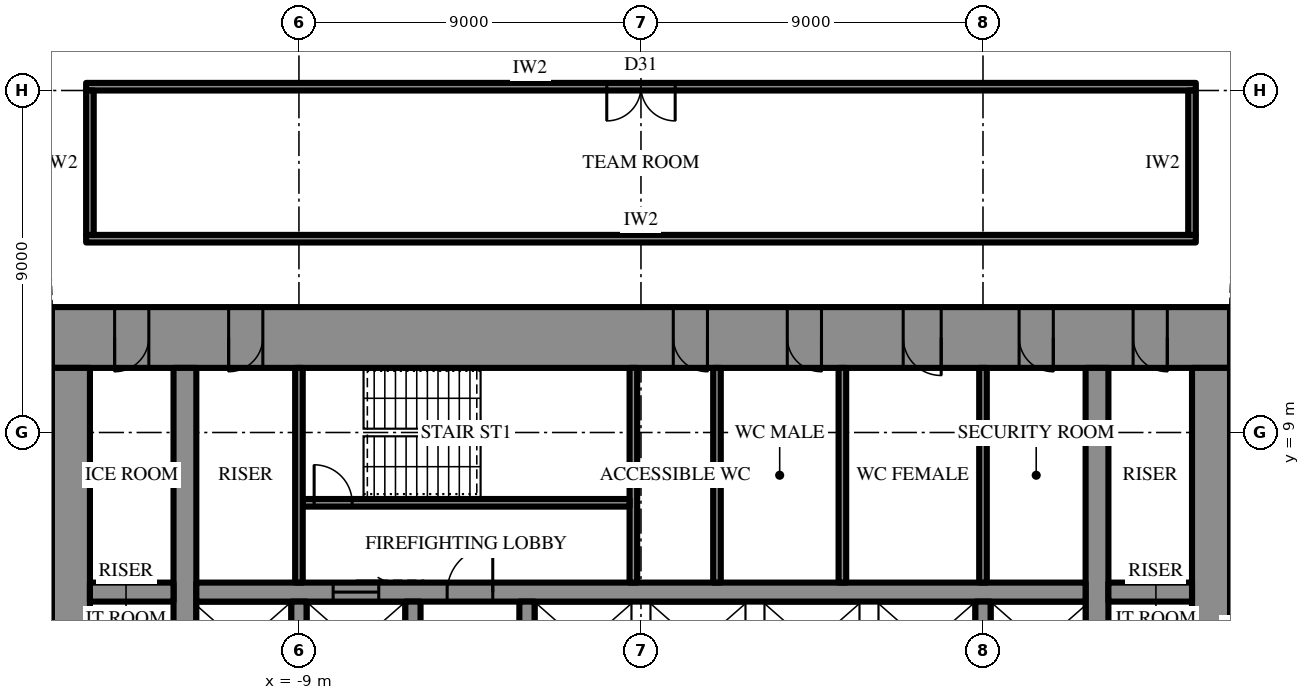
"""IFC4 building model, lengths in metres.
Left out: names, types, materials, properties, quantities, classifications, styles, units other than length and angle.
Written with IfcOpenShell. Run it as: python <this file> out.ifc"""

import sys

from ifc_helpers import new_model, si_unit, direction, frame, frame_2d, origin, place, context, subcontext, project, spatial, rectangle, extrude, element, fill, save


model = new_model("IFC4")
c1 = context("Model", 3, precision=1e-05, world=origin(), true_north=direction((0.0, 1.0)))
c2 = subcontext(c1, "Body", "Model", "MODEL_VIEW")
j1 = project(units=[si_unit("LENGTHUNIT", "METRE"), si_unit("PLANEANGLEUNIT", "RADIAN")], contexts=[c1])
p1 = place(None, origin())
s1 = spatial("IfcSite", under=j1, at=p1, CompositionType="ELEMENT")
p2 = place(p1, origin())
s2 = spatial("IfcBuilding", under=s1, at=p2, CompositionType="ELEMENT")
p3 = place(p2, frame((0.0, 0.0, 286.9)))
s3 = spatial("IfcBuildingStorey", under=s2, at=p3, CompositionType="ELEMENT", Elevation=286.9)
p4 = place(p3, frame((-15.5, 11.5, 0.0), z_axis=(0.0, 0.0, 1.0), x_axis=(1.0, 0.0, 0.0)))
e1 = element("IfcWall", 1, at=p4, inside=s3, PredefinedType="SHEAR", context=c2, shape_type="SweptSolid", body=[
    extrude(rectangle(XDim=31.0, YDim=1.6, at=frame_2d((15.5, 0.0))), origin(), (0.0, 0.0, 1.0), 4.2),
])
p5 = place(p4, frame((16.35, 0.0, 0.0)))
e2 = element("IfcOpeningElement", 2, at=p5, cuts=e1, PredefinedType="OPENING", context=c2, shape_type="SweptSolid", body=[
    extrude(rectangle(XDim=0.9, YDim=2.2, at=frame_2d((0.45, 1.1))), frame((0.0, 0.81, 0.0), z_axis=(0.0, -1.0, 0.0), x_axis=(1.0, 0.0, 0.0)), (0.0, 0.0, 1.0), 1.62),
])
p6 = place(p4, frame((19.35, 0.0, 0.0)))
e3 = element("IfcOpeningElement", 3, at=p6, cuts=e1, PredefinedType="OPENING", context=c2, shape_type="SweptSolid", body=[
    extrude(rectangle(XDim=0.9, YDim=2.2, at=frame_2d((0.45, 1.1))), frame((0.0, 0.81, 0.0), z_axis=(0.0, -1.0, 0.0), x_axis=(1.0, 0.0, 0.0)), (0.0, 0.0, 1.0), 1.62),
])
p7 = place(p4, frame((22.4, 0.0, 0.0)))
e4 = element("IfcOpeningElement", 4, at=p7, cuts=e1, PredefinedType="OPENING", context=c2, shape_type="SweptSolid", body=[
    extrude(rectangle(XDim=1.0, YDim=2.2, at=frame_2d((0.5, 1.1))), frame((0.0, 0.81, 0.0), z_axis=(0.0, -1.0, 0.0), x_axis=(1.0, 0.0, 0.0)), (0.0, 0.0, 1.0), 1.62),
])
p8 = place(p4, frame((1.65, 0.0, 0.0)))
e5 = element("IfcOpeningElement", 5, at=p8, cuts=e1, PredefinedType="OPENING", context=c2, shape_type="SweptSolid", body=[
    extrude(rectangle(XDim=0.9, YDim=2.2, at=frame_2d((0.45, 1.1))), frame((0.0, 0.81, 0.0), z_axis=(0.0, -1.0, 0.0), x_axis=(1.0, 0.0, 0.0)), (0.0, 0.0, 1.0), 1.62),
])
p9 = place(p4, frame((4.65, 0.0, 0.0)))
e6 = element("IfcOpeningElement", 6, at=p9, cuts=e1, PredefinedType="OPENING", context=c2, shape_type="SweptSolid", body=[
    extrude(rectangle(XDim=0.9, YDim=2.2, at=frame_2d((0.45, 1.1))), frame((0.0, 0.81, 0.0), z_axis=(0.0, -1.0, 0.0), x_axis=(1.0, 0.0, 0.0)), (0.0, 0.0, 1.0), 1.62),
])
p10 = place(p4, frame((25.45, 0.0, 0.0)))
e7 = element("IfcOpeningElement", 7, at=p10, cuts=e1, PredefinedType="OPENING", context=c2, shape_type="SweptSolid", body=[
    extrude(rectangle(XDim=0.9, YDim=2.2, at=frame_2d((0.45, 1.1))), frame((0.0, 0.81, 0.0), z_axis=(0.0, -1.0, 0.0), x_axis=(1.0, 0.0, 0.0)), (0.0, 0.0, 1.0), 1.62),
])
p11 = place(p4, frame((28.45, 0.0, 0.0)))
e8 = element("IfcOpeningElement", 8, at=p11, cuts=e1, PredefinedType="OPENING", context=c2, shape_type="SweptSolid", body=[
    extrude(rectangle(XDim=0.9, YDim=2.2, at=frame_2d((0.45, 1.1))), frame((0.0, 0.81, 0.0), z_axis=(0.0, -1.0, 0.0), x_axis=(1.0, 0.0, 0.0)), (0.0, 0.0, 1.0), 1.62),
])
p12 = place(p3, frame((15.0, -10.7, 0.0), z_axis=(0.0, 0.0, 1.0), x_axis=(0.0, 1.0, 0.0)))
e9 = element("IfcWall", 9, at=p12, inside=s3, PredefinedType="SHEAR", context=c2, shape_type="SweptSolid", body=[
    extrude(rectangle(XDim=21.4, YDim=1.0, at=frame_2d((10.7, 0.0))), origin(), (0.0, 0.0, 1.0), 4.2),
])
p13 = place(p12, frame((9.8, 0.0, 0.0)))
e10 = element("IfcOpeningElement", 10, at=p13, cuts=e9, PredefinedType="OPENING", context=c2, shape_type="SweptSolid", body=[
    extrude(rectangle(XDim=1.8, YDim=2.4, at=frame_2d((0.9, 1.2))), frame((0.0, 0.51, 0.0), z_axis=(0.0, -1.0, 0.0), x_axis=(1.0, 0.0, 0.0)), (0.0, 0.0, 1.0), 1.02),
])
p14 = place(p3, frame((-15.0, 10.7, 0.0), z_axis=(0.0, 0.0, 1.0), x_axis=(0.0, -1.0, 0.0)))
e11 = element("IfcWall", 11, at=p14, inside=s3, PredefinedType="SHEAR", context=c2, shape_type="SweptSolid", body=[
    extrude(rectangle(XDim=21.4, YDim=1.0, at=frame_2d((10.7, 0.0))), origin(), (0.0, 0.0, 1.0), 4.2),
])
p15 = place(p14, frame((9.8, 0.0, 0.0)))
e12 = element("IfcOpeningElement", 12, at=p15, cuts=e11, PredefinedType="OPENING", context=c2, shape_type="SweptSolid", body=[
    extrude(rectangle(XDim=1.8, YDim=2.4, at=frame_2d((0.9, 1.2))), frame((0.0, 0.51, 0.0), z_axis=(0.0, -1.0, 0.0), x_axis=(1.0, 0.0, 0.0)), (0.0, 0.0, 1.0), 1.02),
])
p16 = place(p3, frame((12.0, -10.7, 0.0), z_axis=(0.0, 0.0, 1.0), x_axis=(0.0, 1.0, 0.0)))
e13 = element("IfcWall", 13, at=p16, inside=s3, PredefinedType="SHEAR", context=c2, shape_type="SweptSolid", body=[
    extrude(rectangle(XDim=21.4, YDim=0.6, at=frame_2d((10.7, 0.0))), origin(), (0.0, 0.0, 1.0), 4.2),
])
p17 = place(p16, frame((9.8, 0.0, 0.0)))
e14 = element("IfcOpeningElement", 14, at=p17, cuts=e13, PredefinedType="OPENING", context=c2, shape_type="SweptSolid", body=[
    extrude(rectangle(XDim=1.8, YDim=2.4, at=frame_2d((0.9, 1.2))), frame((0.0, 0.31, 0.0), z_axis=(0.0, -1.0, 0.0), x_axis=(1.0, 0.0, 0.0)), (0.0, 0.0, 1.0), 0.62),
])
p18 = place(p3, frame((-12.0, -10.7, 0.0), z_axis=(0.0, 0.0, 1.0), x_axis=(0.0, 1.0, 0.0)))
e15 = element("IfcWall", 15, at=p18, inside=s3, PredefinedType="SHEAR", context=c2, shape_type="SweptSolid", body=[
    extrude(rectangle(XDim=21.4, YDim=0.6, at=frame_2d((10.7, 0.0))), origin(), (0.0, 0.0, 1.0), 4.2),
])
p19 = place(p18, frame((9.8, 0.0, 0.0)))
e16 = element("IfcOpeningElement", 16, at=p19, cuts=e15, PredefinedType="OPENING", context=c2, shape_type="SweptSolid", body=[
    extrude(rectangle(XDim=1.8, YDim=2.4, at=frame_2d((0.9, 1.2))), frame((0.0, 0.31, 0.0), z_axis=(0.0, -1.0, 0.0), x_axis=(1.0, 0.0, 0.0)), (0.0, 0.0, 1.0), 0.62),
])
p20 = place(p3, frame((-14.5, 4.8, 0.0), z_axis=(0.0, 0.0, 1.0), x_axis=(1.0, 0.0, 0.0)))
e17 = element("IfcWall", 17, at=p20, inside=s3, PredefinedType="SHEAR", context=c2, shape_type="SweptSolid", body=[
    extrude(rectangle(XDim=2.2, YDim=0.5, at=frame_2d((1.1, 0.0))), origin(), (0.0, 0.0, 1.0), 4.2),
])
p21 = place(p3, frame((-11.7, 4.8, 0.0), z_axis=(0.0, 0.0, 1.0), x_axis=(1.0, 0.0, 0.0)))
e18 = element("IfcWall", 18, at=p21, inside=s3, PredefinedType="SHEAR", context=c2, shape_type="SweptSolid", body=[
    extrude(rectangle(XDim=23.4, YDim=0.5, at=frame_2d((11.7, 0.0))), origin(), (0.0, 0.0, 1.0), 4.2),
])
p22 = place(p21, frame((6.6, 0.0, 0.0)))
e19 = element("IfcOpeningElement", 19, at=p22, cuts=e18, PredefinedType="OPENING", context=c2, shape_type="SweptSolid", body=[
    extrude(rectangle(XDim=1.2, YDim=2.2, at=frame_2d((0.6, 1.1))), frame((0.0, 0.26, 0.0), z_axis=(0.0, -1.0, 0.0), x_axis=(1.0, 0.0, 0.0)), (0.0, 0.0, 1.0), 0.52),
])
p23 = place(p21, frame((3.6, 0.0, 0.0)))
e20 = element("IfcOpeningElement", 20, at=p23, cuts=e18, PredefinedType="OPENING", context=c2, shape_type="SweptSolid", body=[
    extrude(rectangle(XDim=1.2, YDim=2.2, at=frame_2d((0.6, 1.1))), frame((0.0, 0.26, 0.0), z_axis=(0.0, -1.0, 0.0), x_axis=(1.0, 0.0, 0.0)), (0.0, 0.0, 1.0), 0.52),
])
p24 = place(p3, frame((12.3, 4.8, 0.0), z_axis=(0.0, 0.0, 1.0), x_axis=(1.0, 0.0, 0.0)))
e21 = element("IfcWall", 21, at=p24, inside=s3, PredefinedType="SHEAR", context=c2, shape_type="SweptSolid", body=[
    extrude(rectangle(XDim=2.2, YDim=0.5, at=frame_2d((1.1, 0.0))), origin(), (0.0, 0.0, 1.0), 4.2),
])
for number, where, z_axis, x_axis in (
    (22, (-9.0, 2.25, 0.0), (0.0, 0.0, 1.0), (0.0, 1.0, 0.0)),
    (23, (-6.0, 2.25, 0.0), (0.0, 0.0, 1.0), (0.0, 1.0, 0.0)),
    (24, (-3.0, 2.25, 0.0), (0.0, 0.0, 1.0), (0.0, 1.0, 0.0)),
    (25, (9.0, 2.25, 0.0), (0.0, 0.0, 1.0), (0.0, 1.0, 0.0)),
):
    element("IfcWall", number, at=place(p3, frame(where, z_axis=z_axis, x_axis=x_axis)), inside=s3, PredefinedType="SHEAR", context=c2, shape_type="SweptSolid", body=[
        extrude(rectangle(XDim=2.3, YDim=0.4, at=frame_2d((1.15, 0.0))), origin(), (0.0, 0.0, 1.0), 4.2),
    ])
p25 = place(p3, frame((-0.2, 5.05, 0.0), z_axis=(0.0, 0.0, 1.0), x_axis=(0.0, 1.0, 0.0)))
e26 = element("IfcWall", 26, at=p25, inside=s3, PredefinedType="SHEAR", context=c2, shape_type="SweptSolid", body=[
    extrude(rectangle(XDim=5.65, YDim=0.2, at=frame_2d((2.825, 0.0))), origin(), (0.0, 0.0, 1.0), 4.2),
])
p26 = place(p3, frame((-8.9, 7.15, 0.0), z_axis=(0.0, 0.0, 1.0), x_axis=(1.0, 0.0, 0.0)))
e27 = element("IfcWall", 27, at=p26, inside=s3, PredefinedType="SHEAR", context=c2, shape_type="SweptSolid", body=[
    extrude(rectangle(XDim=8.6, YDim=0.2, at=frame_2d((4.3, 0.0))), origin(), (0.0, 0.0, 1.0), 4.2),
])
p27 = place(p26, frame((0.3, 0.0, 0.0)))
e28 = element("IfcOpeningElement", 28, at=p27, cuts=e27, PredefinedType="OPENING", context=c2, shape_type="SweptSolid", body=[
    extrude(rectangle(XDim=1.0, YDim=2.2, at=frame_2d((0.5, 1.1))), frame((0.0, 0.11, 0.0), z_axis=(0.0, -1.0, 0.0), x_axis=(1.0, 0.0, 0.0)), (0.0, 0.0, 1.0), 0.22),
])
for number, where, z_axis, x_axis in (
    (29, (-9.0, 5.05, 0.0), (0.0, 0.0, 1.0), (0.0, 1.0, 0.0)),
    (30, (9.0, 5.05, 0.0), (0.0, 0.0, 1.0), (0.0, 1.0, 0.0)),
    (31, (2.0, 5.05, 0.0), (0.0, 0.0, 1.0), (0.0, 1.0, 0.0)),
    (32, (5.3, 5.05, 0.0), (0.0, 0.0, 1.0), (0.0, 1.0, 0.0)),
):
    element("IfcWall", number, at=place(p3, frame(where, z_axis=z_axis, x_axis=x_axis)), inside=s3, PredefinedType="PARTITIONING", context=c2, shape_type="SweptSolid", body=[
        extrude(rectangle(XDim=5.65, YDim=0.2, at=frame_2d((2.825, 0.0))), origin(), (0.0, 0.0, 1.0), 4.0),
    ])
p28 = place(p3, frame((-14.6, 14.1, 0.0), z_axis=(0.0, 0.0, 1.0), x_axis=(1.0, 0.0, 0.0)))
e33 = element("IfcWall", 33, at=p28, inside=s3, PredefinedType="PARTITIONING", context=c2, shape_type="SweptSolid", body=[
    extrude(rectangle(XDim=29.2, YDim=0.2, at=frame_2d((14.6, 0.0))), origin(), (0.0, 0.0, 1.0), 4.0),
])
p29 = place(p3, frame((-14.6, 18.1, 0.0), z_axis=(0.0, 0.0, 1.0), x_axis=(1.0, 0.0, 0.0)))
e34 = element("IfcWall", 34, at=p29, inside=s3, PredefinedType="PARTITIONING", context=c2, shape_type="SweptSolid", body=[
    extrude(rectangle(XDim=29.2, YDim=0.2, at=frame_2d((14.6, 0.0))), origin(), (0.0, 0.0, 1.0), 4.0),
])
p30 = place(p29, frame((13.7, 0.0, 0.0)))
e35 = element("IfcOpeningElement", 35, at=p30, cuts=e34, PredefinedType="OPENING", context=c2, shape_type="SweptSolid", body=[
    extrude(rectangle(XDim=1.8, YDim=2.4, at=frame_2d((0.9, 1.2))), frame((0.0, 0.11, 0.0), z_axis=(0.0, -1.0, 0.0), x_axis=(1.0, 0.0, 0.0)), (0.0, 0.0, 1.0), 0.22),
])
for number, where, z_axis, x_axis in (
    (36, (-14.5, 14.2, 0.0), (0.0, 0.0, 1.0), (0.0, 1.0, 0.0)),
    (37, (14.5, 14.2, 0.0), (0.0, 0.0, 1.0), (0.0, 1.0, 0.0)),
):
    element("IfcWall", number, at=place(p3, frame(where, z_axis=z_axis, x_axis=x_axis)), inside=s3, PredefinedType="PARTITIONING", context=c2, shape_type="SweptSolid", body=[
        extrude(rectangle(XDim=3.8, YDim=0.2, at=frame_2d((1.9, 0.0))), origin(), (0.0, 0.0, 1.0), 4.0),
    ])
p31 = place(p22, origin())
e38 = element("IfcDoor", 38, at=p31, inside=s3, OperationType="SINGLE_SWING_LEFT", PredefinedType="DOOR", context=c2, shape_type="SweptSolid", body=[
    extrude(rectangle(XDim=1.2, YDim=2.2, at=frame_2d((0.6, 1.1))), frame((0.0, 0.025, 0.0), z_axis=(0.0, -1.0, 0.0), x_axis=(1.0, 0.0, 0.0)), (0.0, 0.0, 1.0), 0.05),
])
fill(e19, e38)
p32 = place(p27, origin())
e39 = element("IfcDoor", 39, at=p32, inside=s3, OperationType="SINGLE_SWING_RIGHT", PredefinedType="DOOR", context=c2, shape_type="SweptSolid", body=[
    extrude(rectangle(XDim=1.0, YDim=2.2, at=frame_2d((0.5, 1.1))), frame((0.0, 0.025, 0.0), z_axis=(0.0, -1.0, 0.0), x_axis=(1.0, 0.0, 0.0)), (0.0, 0.0, 1.0), 0.05),
])
fill(e28, e39)
p33 = place(p5, frame((0.9, 0.0, 0.0), z_axis=(0.0, 0.0, 1.0), x_axis=(-1.0, 0.0, 0.0)))
e40 = element("IfcDoor", 40, at=p33, inside=s3, OperationType="SINGLE_SWING_RIGHT", PredefinedType="DOOR", context=c2, shape_type="SweptSolid", body=[
    extrude(rectangle(XDim=0.9, YDim=2.2, at=frame_2d((0.45, 1.1))), frame((0.0, 0.025, 0.0), z_axis=(0.0, -1.0, 0.0), x_axis=(1.0, 0.0, 0.0)), (0.0, 0.0, 1.0), 0.05),
])
fill(e2, e40)
p34 = place(p6, frame((0.9, 0.0, 0.0), z_axis=(0.0, 0.0, 1.0), x_axis=(-1.0, 0.0, 0.0)))
e41 = element("IfcDoor", 41, at=p34, inside=s3, OperationType="SINGLE_SWING_RIGHT", PredefinedType="DOOR", context=c2, shape_type="SweptSolid", body=[
    extrude(rectangle(XDim=0.9, YDim=2.2, at=frame_2d((0.45, 1.1))), frame((0.0, 0.025, 0.0), z_axis=(0.0, -1.0, 0.0), x_axis=(1.0, 0.0, 0.0)), (0.0, 0.0, 1.0), 0.05),
])
fill(e3, e41)
p35 = place(p7, frame((1.0, 0.0, 0.0), z_axis=(0.0, 0.0, 1.0), x_axis=(-1.0, 0.0, 0.0)))
e42 = element("IfcDoor", 42, at=p35, inside=s3, OperationType="SINGLE_SWING_RIGHT", PredefinedType="DOOR", context=c2, shape_type="SweptSolid", body=[
    extrude(rectangle(XDim=1.0, YDim=2.2, at=frame_2d((0.5, 1.1))), frame((0.0, 0.025, 0.0), z_axis=(0.0, -1.0, 0.0), x_axis=(1.0, 0.0, 0.0)), (0.0, 0.0, 1.0), 0.05),
])
fill(e4, e42)
p36 = place(p8, frame((0.9, 0.0, 0.0), z_axis=(0.0, 0.0, 1.0), x_axis=(-1.0, 0.0, 0.0)))
e43 = element("IfcDoor", 43, at=p36, inside=s3, OperationType="SINGLE_SWING_LEFT", PredefinedType="DOOR", context=c2, shape_type="SweptSolid", body=[
    extrude(rectangle(XDim=0.9, YDim=2.2, at=frame_2d((0.45, 1.1))), frame((0.0, 0.025, 0.0), z_axis=(0.0, -1.0, 0.0), x_axis=(1.0, 0.0, 0.0)), (0.0, 0.0, 1.0), 0.05),
])
fill(e5, e43)
p37 = place(p9, frame((0.9, 0.0, 0.0), z_axis=(0.0, 0.0, 1.0), x_axis=(-1.0, 0.0, 0.0)))
e44 = element("IfcDoor", 44, at=p37, inside=s3, OperationType="SINGLE_SWING_LEFT", PredefinedType="DOOR", context=c2, shape_type="SweptSolid", body=[
    extrude(rectangle(XDim=0.9, YDim=2.2, at=frame_2d((0.45, 1.1))), frame((0.0, 0.025, 0.0), z_axis=(0.0, -1.0, 0.0), x_axis=(1.0, 0.0, 0.0)), (0.0, 0.0, 1.0), 0.05),
])
fill(e6, e44)
p38 = place(p10, frame((0.9, 0.0, 0.0), z_axis=(0.0, 0.0, 1.0), x_axis=(-1.0, 0.0, 0.0)))
e45 = element("IfcDoor", 45, at=p38, inside=s3, OperationType="SINGLE_SWING_RIGHT", PredefinedType="DOOR", context=c2, shape_type="SweptSolid", body=[
    extrude(rectangle(XDim=0.9, YDim=2.2, at=frame_2d((0.45, 1.1))), frame((0.0, 0.025, 0.0), z_axis=(0.0, -1.0, 0.0), x_axis=(1.0, 0.0, 0.0)), (0.0, 0.0, 1.0), 0.05),
])
fill(e7, e45)
p39 = place(p11, frame((0.9, 0.0, 0.0), z_axis=(0.0, 0.0, 1.0), x_axis=(-1.0, 0.0, 0.0)))
e46 = element("IfcDoor", 46, at=p39, inside=s3, OperationType="SINGLE_SWING_RIGHT", PredefinedType="DOOR", context=c2, shape_type="SweptSolid", body=[
    extrude(rectangle(XDim=0.9, YDim=2.2, at=frame_2d((0.45, 1.1))), frame((0.0, 0.025, 0.0), z_axis=(0.0, -1.0, 0.0), x_axis=(1.0, 0.0, 0.0)), (0.0, 0.0, 1.0), 0.05),
])
fill(e8, e46)
p40 = place(p23, origin())
e47 = element("IfcDoor", 47, at=p40, inside=s3, OperationType="SLIDING_TO_LEFT", PredefinedType="DOOR", context=c2, shape_type="SweptSolid", body=[
    extrude(rectangle(XDim=1.2, YDim=2.2, at=frame_2d((0.6, 1.1))), frame((0.0, 0.025, 0.0), z_axis=(0.0, -1.0, 0.0), x_axis=(1.0, 0.0, 0.0)), (0.0, 0.0, 1.0), 0.05),
])
fill(e20, e47)
p41 = place(p30, frame((1.8, 0.0, 0.0), z_axis=(0.0, 0.0, 1.0), x_axis=(-1.0, 0.0, 0.0)))
e48 = element("IfcDoor", 48, at=p41, inside=s3, OperationType="DOUBLE_DOOR_SINGLE_SWING", PredefinedType="DOOR", context=c2, shape_type="SweptSolid", body=[
    extrude(rectangle(XDim=1.8, YDim=2.4, at=frame_2d((0.9, 1.2))), frame((0.0, 0.025, 0.0), z_axis=(0.0, -1.0, 0.0), x_axis=(1.0, 0.0, 0.0)), (0.0, 0.0, 1.0), 0.05),
])
fill(e35, e48)
save(model, sys.argv[1])
